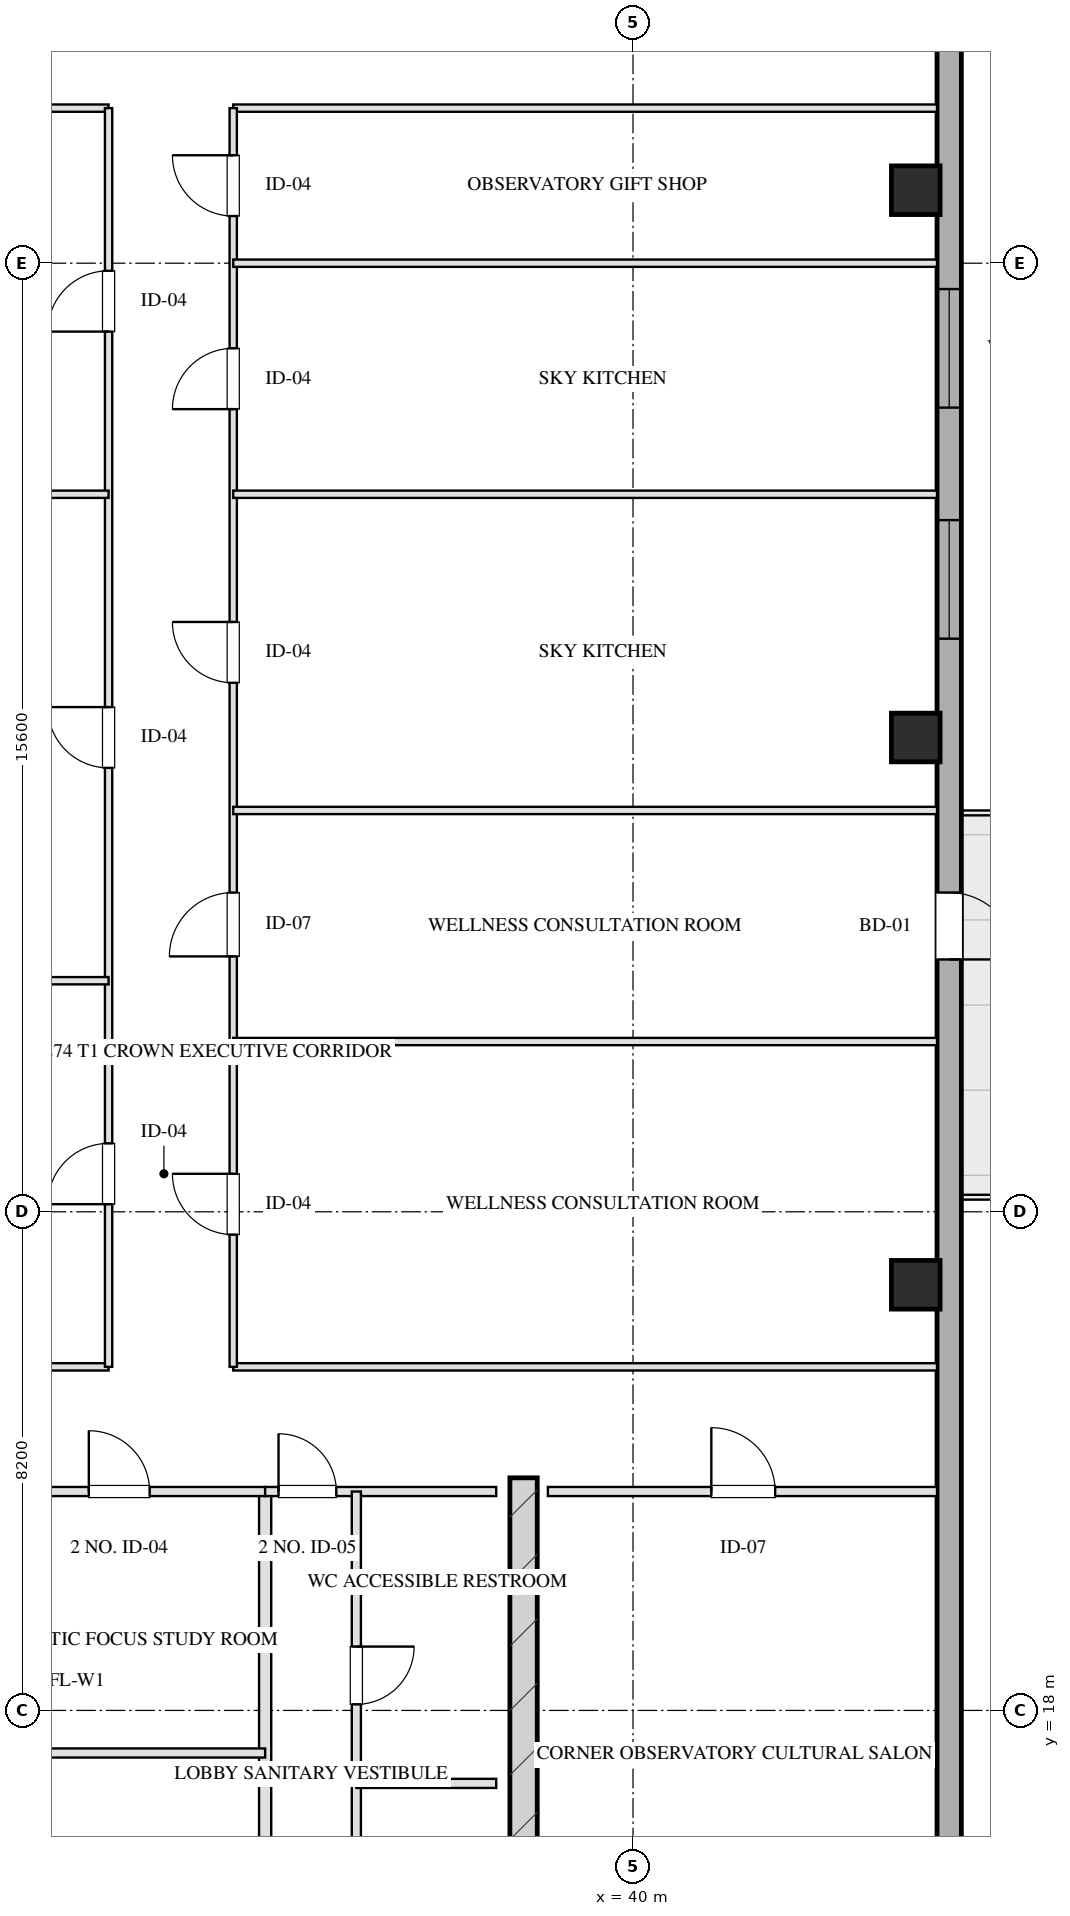
"""IFC4 building model, lengths in metres.
Left out: names, types, materials, properties, quantities, classifications, styles, units other than length and angle.
Written with IfcOpenShell. Run it as: python <this file> out.ifc"""

import sys

from ifc_helpers import new_model, si_unit, direction, frame, frame_2d, origin, origin_2d, place, context, subcontext, project, spatial, rectangle, hollow_rectangle, extrude, element, fill, save


model = new_model("IFC4")
c1 = context("Model", 3, precision=1e-05, world=origin(), true_north=direction((0.0, 1.0)))
c2 = subcontext(c1, "Body", "Model", "MODEL_VIEW")
j1 = project(units=[si_unit("LENGTHUNIT", "METRE"), si_unit("PLANEANGLEUNIT", "RADIAN")], contexts=[c1])
p1 = place(None, origin())
s1 = spatial("IfcSite", under=j1, at=p1, CompositionType="ELEMENT")
p2 = place(p1, origin())
s2 = spatial("IfcBuilding", under=s1, at=p2, CompositionType="ELEMENT")
p3 = place(p2, frame((0.0, 0.0, 269.6)))
s3 = spatial("IfcBuildingStorey", under=s2, at=p3, CompositionType="ELEMENT", Elevation=269.6)
p4 = place(p3, frame((38.2, 21.825, 0.0), z_axis=(0.0, 0.0, 1.0), x_axis=(0.0, -1.0, 0.0)))
e1 = element("IfcWall", 1, at=p4, inside=s3, PredefinedType="SHEAR", context=c2, shape_type="SweptSolid", body=[
    extrude(rectangle(XDim=9.33, YDim=0.45, at=frame_2d((4.665, 0.0))), origin(), (0.0, 0.0, 1.0), 3.2),
])
for number, where, z_axis, x_axis in (
    (2, (44.65, 25.0, 0.0), (0.0, 0.0, 1.0), (1.0, 0.0, 0.0)),
    (3, (44.65, 34.0, 0.0), (0.0, 0.0, 1.0), (1.0, 0.0, 0.0)),
    (4, (44.65, 43.0, 0.0), (0.0, 0.0, 1.0), (1.0, 0.0, 0.0)),
):
    element("IfcColumn", number, at=place(p3, frame(where, z_axis=z_axis, x_axis=x_axis)), inside=s3, PredefinedType="COLUMN", context=c2, shape_type="SweptSolid", body=[
        extrude(hollow_rectangle(XDim=0.8, YDim=0.8, WallThickness=0.028, at=origin_2d()), origin(), (0.0, 0.0, 1.0), 3.201),
    ])
p5 = place(p3, frame((45.2, 54.9, 0.0), z_axis=(0.0, 0.0, 1.0), x_axis=(0.0, -1.0, 0.0)))
e5 = element("IfcWall", 5, at=p5, inside=s3, PredefinedType="SOLIDWALL", context=c2, shape_type="SweptSolid", body=[
    extrude(rectangle(XDim=41.8, YDim=0.4, at=frame_2d((20.9, 0.0))), origin(), (0.0, 0.0, 1.0), 2.36),
])
p6 = place(p5, frame((17.325, 0.0, 0.75)))
e6 = element("IfcOpeningElement", 6, at=p6, cuts=e5, PredefinedType="OPENING", context=c2, shape_type="SweptSolid", body=[
    extrude(rectangle(XDim=1.95, YDim=1.21, at=frame_2d((0.975, 0.605))), frame((0.0, 0.21, 0.0), z_axis=(0.0, -1.0, 0.0), x_axis=(1.0, 0.0, 0.0)), (0.0, 0.0, 1.0), 0.42),
])
p7 = place(p5, frame((13.525, 0.0, 0.75)))
e7 = element("IfcOpeningElement", 7, at=p7, cuts=e5, PredefinedType="OPENING", context=c2, shape_type="SweptSolid", body=[
    extrude(rectangle(XDim=1.95, YDim=1.21, at=frame_2d((0.975, 0.605))), frame((0.0, 0.21, 0.0), z_axis=(0.0, -1.0, 0.0), x_axis=(1.0, 0.0, 0.0)), (0.0, 0.0, 1.0), 0.42),
])
p8 = place(p5, frame((23.45, 0.0, 0.0)))
e8 = element("IfcOpeningElement", 8, at=p8, cuts=e5, PredefinedType="OPENING", context=c2, shape_type="SweptSolid", body=[
    extrude(rectangle(XDim=1.1, YDim=2.15, at=frame_2d((0.55, 1.075))), frame((0.0, 0.21, 0.0), z_axis=(0.0, -1.0, 0.0), x_axis=(1.0, 0.0, 0.0)), (0.0, 0.0, 1.0), 0.42),
])
p9 = place(p3, frame((33.95, 21.6, 0.0), z_axis=(0.0, 0.0, 1.0), x_axis=(0.0, -1.0, 0.0)))
e9 = element("IfcWall", 9, at=p9, inside=s3, PredefinedType="PARTITIONING", context=c2, shape_type="SweptSolid", body=[
    extrude(rectangle(XDim=8.43, YDim=0.2, at=frame_2d((4.215, 0.0))), origin(), (0.0, 0.0, 1.0), 2.925),
])
p10 = place(p3, frame((29.55, 21.6, 0.0), z_axis=(0.0, 0.0, 1.0), x_axis=(1.0, 0.0, 0.0)))
e10 = element("IfcWall", 10, at=p10, inside=s3, PredefinedType="PARTITIONING", context=c2, shape_type="SweptSolid", body=[
    extrude(rectangle(XDim=4.4, YDim=0.15, at=frame_2d((2.2, 0.0))), origin(), (0.0, 0.0, 1.0), 2.925),
])
p11 = place(p10, frame((1.5, 0.0, 0.0)))
e11 = element("IfcOpeningElement", 11, at=p11, cuts=e10, PredefinedType="OPENING", context=c2, shape_type="SweptSolid", body=[
    extrude(rectangle(XDim=1.0, YDim=2.05, at=frame_2d((0.5, 1.025))), frame((0.0, 0.085, 0.0), z_axis=(0.0, -1.0, 0.0), x_axis=(1.0, 0.0, 0.0)), (0.0, 0.0, 1.0), 0.17),
])
p12 = place(p3, frame((29.55, 17.3, 0.0), z_axis=(0.0, 0.0, 1.0), x_axis=(1.0, 0.0, 0.0)))
e12 = element("IfcWall", 12, at=p12, inside=s3, PredefinedType="PARTITIONING", context=c2, shape_type="SweptSolid", body=[
    extrude(rectangle(XDim=4.4, YDim=0.15, at=frame_2d((2.2, 0.0))), origin(), (0.0, 0.0, 1.0), 2.925),
])
p13 = place(p3, frame((33.95, 21.6, 0.0), z_axis=(0.0, 0.0, 1.0), x_axis=(1.0, 0.0, 0.0)))
e13 = element("IfcWall", 13, at=p13, inside=s3, PredefinedType="PARTITIONING", context=c2, shape_type="SweptSolid", body=[
    extrude(rectangle(XDim=3.8, YDim=0.15, at=frame_2d((1.9, 0.0))), origin(), (0.0, 0.0, 1.0), 2.925),
])
p14 = place(p13, frame((0.22, 0.0, 0.0)))
e14 = element("IfcOpeningElement", 14, at=p14, cuts=e13, PredefinedType="OPENING", context=c2, shape_type="SweptSolid", body=[
    extrude(rectangle(XDim=0.95, YDim=2.05, at=frame_2d((0.475, 1.025))), frame((0.0, 0.085, 0.0), z_axis=(0.0, -1.0, 0.0), x_axis=(1.0, 0.0, 0.0)), (0.0, 0.0, 1.0), 0.17),
])
p15 = place(p3, frame((35.45, 21.6, 0.0), z_axis=(0.0, 0.0, 1.0), x_axis=(0.0, -1.0, 0.0)))
e15 = element("IfcWall", 15, at=p15, inside=s3, PredefinedType="PARTITIONING", context=c2, shape_type="SweptSolid", body=[
    extrude(rectangle(XDim=8.43, YDim=0.15, at=frame_2d((4.215, 0.0))), origin(), (0.0, 0.0, 1.0), 2.515),
])
p16 = place(p15, frame((2.55, 0.0, 0.0)))
e16 = element("IfcOpeningElement", 16, at=p16, cuts=e15, PredefinedType="OPENING", context=c2, shape_type="SweptSolid", body=[
    extrude(rectangle(XDim=0.95, YDim=2.05, at=frame_2d((0.475, 1.025))), frame((0.0, 0.085, 0.0), z_axis=(0.0, -1.0, 0.0), x_axis=(1.0, 0.0, 0.0)), (0.0, 0.0, 1.0), 0.17),
])
p17 = place(p15, frame((5.8, 0.0, 0.0)))
e17 = element("IfcOpeningElement", 17, at=p17, cuts=e15, PredefinedType="OPENING", context=c2, shape_type="SweptSolid", body=[
    extrude(rectangle(XDim=0.9, YDim=2.05, at=frame_2d((0.45, 1.025))), frame((0.0, 0.085, 0.0), z_axis=(0.0, -1.0, 0.0), x_axis=(1.0, 0.0, 0.0)), (0.0, 0.0, 1.0), 0.17),
])
p18 = place(p3, frame((35.45, 16.8, 0.0), z_axis=(0.0, 0.0, 1.0), x_axis=(1.0, 0.0, 0.0)))
e18 = element("IfcWall", 18, at=p18, inside=s3, PredefinedType="PARTITIONING", context=c2, shape_type="SweptSolid", body=[
    extrude(rectangle(XDim=2.3, YDim=0.15, at=frame_2d((1.15, 0.0))), origin(), (0.0, 0.0, 1.0), 2.925),
])
p19 = place(p3, frame((38.6, 21.6, 0.0), z_axis=(0.0, 0.0, 1.0), x_axis=(1.0, 0.0, 0.0)))
e19 = element("IfcWall", 19, at=p19, inside=s3, PredefinedType="PARTITIONING", context=c2, shape_type="SweptSolid", body=[
    extrude(rectangle(XDim=6.4, YDim=0.15, at=frame_2d((3.2, 0.0))), origin(), (0.0, 0.0, 1.0), 2.925),
])
p20 = place(p19, frame((2.688, 0.0, 0.0)))
e20 = element("IfcOpeningElement", 20, at=p20, cuts=e19, PredefinedType="OPENING", context=c2, shape_type="SweptSolid", body=[
    extrude(rectangle(XDim=1.05, YDim=2.05, at=frame_2d((0.525, 1.025))), frame((0.0, 0.085, 0.0), z_axis=(0.0, -1.0, 0.0), x_axis=(1.0, 0.0, 0.0)), (0.0, 0.0, 1.0), 0.17),
])
p21 = place(p3, frame((15.0, 23.65, 0.0), z_axis=(0.0, 0.0, 1.0), x_axis=(1.0, 0.0, 0.0)))
e21 = element("IfcWall", 21, at=p21, inside=s3, PredefinedType="PARTITIONING", context=c2, shape_type="SweptSolid", body=[
    extrude(rectangle(XDim=16.375, YDim=0.12, at=frame_2d((8.188, 0.0))), origin(), (0.0, 0.0, 1.0), 2.925),
])
p22 = place(p3, frame((33.425, 23.65, 0.0), z_axis=(0.0, 0.0, 1.0), x_axis=(1.0, 0.0, 0.0)))
e22 = element("IfcWall", 22, at=p22, inside=s3, PredefinedType="PARTITIONING", context=c2, shape_type="SweptSolid", body=[
    extrude(rectangle(XDim=11.575, YDim=0.12, at=frame_2d((5.788, 0.0))), origin(), (0.0, 0.0, 1.0), 2.925),
])
p23 = place(p3, frame((15.0, 44.35, 0.0), z_axis=(0.0, 0.0, 1.0), x_axis=(1.0, 0.0, 0.0)))
e23 = element("IfcWall", 23, at=p23, inside=s3, PredefinedType="PARTITIONING", context=c2, shape_type="SweptSolid", body=[
    extrude(rectangle(XDim=16.375, YDim=0.12, at=frame_2d((8.188, 0.0))), origin(), (0.0, 0.0, 1.0), 2.925),
])
p24 = place(p3, frame((33.425, 44.35, 0.0), z_axis=(0.0, 0.0, 1.0), x_axis=(1.0, 0.0, 0.0)))
e24 = element("IfcWall", 24, at=p24, inside=s3, PredefinedType="PARTITIONING", context=c2, shape_type="SweptSolid", body=[
    extrude(rectangle(XDim=11.575, YDim=0.12, at=frame_2d((5.788, 0.0))), origin(), (0.0, 0.0, 1.0), 2.925),
])
p25 = place(p3, frame((31.375, 23.65, 0.0), z_axis=(0.0, 0.0, 1.0), x_axis=(0.0, 1.0, 0.0)))
e25 = element("IfcWall", 25, at=p25, inside=s3, PredefinedType="PARTITIONING", context=c2, shape_type="SweptSolid", body=[
    extrude(rectangle(XDim=20.7, YDim=0.12, at=frame_2d((10.35, 0.0))), origin(), (0.0, 0.0, 1.0), 2.925),
])
p26 = place(p25, frame((2.675, 0.0, 0.0)))
e26 = element("IfcOpeningElement", 26, at=p26, cuts=e25, PredefinedType="OPENING", context=c2, shape_type="SweptSolid", body=[
    extrude(rectangle(XDim=1.0, YDim=2.05, at=frame_2d((0.5, 1.025))), frame((0.0, 0.07, 0.0), z_axis=(0.0, -1.0, 0.0), x_axis=(1.0, 0.0, 0.0)), (0.0, 0.0, 1.0), 0.14),
])
p27 = place(p25, frame((9.85, 0.0, 0.0)))
e27 = element("IfcOpeningElement", 27, at=p27, cuts=e25, PredefinedType="OPENING", context=c2, shape_type="SweptSolid", body=[
    extrude(rectangle(XDim=1.0, YDim=2.05, at=frame_2d((0.5, 1.025))), frame((0.0, 0.07, 0.0), z_axis=(0.0, -1.0, 0.0), x_axis=(1.0, 0.0, 0.0)), (0.0, 0.0, 1.0), 0.14),
])
p28 = place(p25, frame((17.025, 0.0, 0.0)))
e28 = element("IfcOpeningElement", 28, at=p28, cuts=e25, PredefinedType="OPENING", context=c2, shape_type="SweptSolid", body=[
    extrude(rectangle(XDim=1.0, YDim=2.05, at=frame_2d((0.5, 1.025))), frame((0.0, 0.07, 0.0), z_axis=(0.0, -1.0, 0.0), x_axis=(1.0, 0.0, 0.0)), (0.0, 0.0, 1.0), 0.14),
])
p29 = place(p3, frame((33.425, 23.65, 0.0), z_axis=(0.0, 0.0, 1.0), x_axis=(0.0, 1.0, 0.0)))
e29 = element("IfcWall", 29, at=p29, inside=s3, PredefinedType="PARTITIONING", context=c2, shape_type="SweptSolid", body=[
    extrude(rectangle(XDim=20.7, YDim=0.12, at=frame_2d((10.35, 0.0))), origin(), (0.0, 0.0, 1.0), 2.925),
])
p30 = place(p29, frame((2.175, 0.0, 0.0)))
e30 = element("IfcOpeningElement", 30, at=p30, cuts=e29, PredefinedType="OPENING", context=c2, shape_type="SweptSolid", body=[
    extrude(rectangle(XDim=1.0, YDim=2.05, at=frame_2d((0.5, 1.025))), frame((0.0, 0.07, 0.0), z_axis=(0.0, -1.0, 0.0), x_axis=(1.0, 0.0, 0.0)), (0.0, 0.0, 1.0), 0.14),
])
p31 = place(p29, frame((6.75, 0.0, 0.0)))
e31 = element("IfcOpeningElement", 31, at=p31, cuts=e29, PredefinedType="OPENING", context=c2, shape_type="SweptSolid", body=[
    extrude(rectangle(XDim=1.05, YDim=2.05, at=frame_2d((0.525, 1.025))), frame((0.0, 0.07, 0.0), z_axis=(0.0, -1.0, 0.0), x_axis=(1.0, 0.0, 0.0)), (0.0, 0.0, 1.0), 0.14),
])
p32 = place(p29, frame((11.25, 0.0, 0.0)))
e32 = element("IfcOpeningElement", 32, at=p32, cuts=e29, PredefinedType="OPENING", context=c2, shape_type="SweptSolid", body=[
    extrude(rectangle(XDim=1.0, YDim=2.05, at=frame_2d((0.5, 1.025))), frame((0.0, 0.07, 0.0), z_axis=(0.0, -1.0, 0.0), x_axis=(1.0, 0.0, 0.0)), (0.0, 0.0, 1.0), 0.14),
])
p33 = place(p29, frame((15.75, 0.0, 0.0)))
e33 = element("IfcOpeningElement", 33, at=p33, cuts=e29, PredefinedType="OPENING", context=c2, shape_type="SweptSolid", body=[
    extrude(rectangle(XDim=1.0, YDim=2.05, at=frame_2d((0.5, 1.025))), frame((0.0, 0.07, 0.0), z_axis=(0.0, -1.0, 0.0), x_axis=(1.0, 0.0, 0.0)), (0.0, 0.0, 1.0), 0.14),
])
p34 = place(p29, frame((18.925, 0.0, 0.0)))
e34 = element("IfcOpeningElement", 34, at=p34, cuts=e29, PredefinedType="OPENING", context=c2, shape_type="SweptSolid", body=[
    extrude(rectangle(XDim=1.0, YDim=2.05, at=frame_2d((0.5, 1.025))), frame((0.0, 0.07, 0.0), z_axis=(0.0, -1.0, 0.0), x_axis=(1.0, 0.0, 0.0)), (0.0, 0.0, 1.0), 0.14),
])
for number, where, z_axis, x_axis in (
    (35, (15.0, 30.0, 0.0), (0.0, 0.0, 1.0), (1.0, 0.0, 0.0)),
    (36, (15.0, 38.0, 0.0), (0.0, 0.0, 1.0), (1.0, 0.0, 0.0)),
):
    element("IfcWall", number, at=place(p3, frame(where, z_axis=z_axis, x_axis=x_axis)), inside=s3, PredefinedType="PARTITIONING", context=c2, shape_type="SweptSolid", body=[
        extrude(rectangle(XDim=16.375, YDim=0.12, at=frame_2d((8.188, 0.0))), origin(), (0.0, 0.0, 1.0), 2.925),
    ])
for number, where, z_axis, x_axis in (
    (37, (33.425, 29.0, 0.0), (0.0, 0.0, 1.0), (1.0, 0.0, 0.0)),
    (38, (33.425, 32.8, 0.0), (0.0, 0.0, 1.0), (1.0, 0.0, 0.0)),
    (39, (33.425, 38.0, 0.0), (0.0, 0.0, 1.0), (1.0, 0.0, 0.0)),
    (40, (33.425, 41.8, 0.0), (0.0, 0.0, 1.0), (1.0, 0.0, 0.0)),
):
    element("IfcWall", number, at=place(p3, frame(where, z_axis=z_axis, x_axis=x_axis)), inside=s3, PredefinedType="PARTITIONING", context=c2, shape_type="SweptSolid", body=[
        extrude(rectangle(XDim=11.575, YDim=0.12, at=frame_2d((5.788, 0.0))), origin(), (0.0, 0.0, 1.0), 2.925),
    ])
p35 = place(p6, origin())
e41 = element("IfcWindow", 41, at=p35, inside=s3, PartitioningType="TRIPLE_PANEL_VERTICAL", PredefinedType="WINDOW", context=c2, shape_type="SweptSolid", body=[
    extrude(rectangle(XDim=1.95, YDim=1.21, at=frame_2d((0.975, 0.605))), frame((0.0, 0.03, 0.0), z_axis=(0.0, -1.0, 0.0), x_axis=(1.0, 0.0, 0.0)), (0.0, 0.0, 1.0), 0.06),
])
fill(e6, e41)
p36 = place(p7, origin())
e42 = element("IfcWindow", 42, at=p36, inside=s3, PartitioningType="TRIPLE_PANEL_VERTICAL", PredefinedType="WINDOW", context=c2, shape_type="SweptSolid", body=[
    extrude(rectangle(XDim=1.95, YDim=1.21, at=frame_2d((0.975, 0.605))), frame((0.0, 0.03, 0.0), z_axis=(0.0, -1.0, 0.0), x_axis=(1.0, 0.0, 0.0)), (0.0, 0.0, 1.0), 0.06),
])
fill(e7, e42)
p37 = place(p8, origin())
e43 = element("IfcDoor", 43, at=p37, inside=s3, OperationType="SINGLE_SWING_RIGHT", PredefinedType="DOOR", context=c2, shape_type="SweptSolid", body=[
    extrude(rectangle(XDim=1.1, YDim=2.15, at=frame_2d((0.55, 1.075))), frame((0.0, 0.025, 0.0), z_axis=(0.0, -1.0, 0.0), x_axis=(1.0, 0.0, 0.0)), (0.0, 0.0, 1.0), 0.05),
])
fill(e8, e43)
p38 = place(p11, origin())
e44 = element("IfcDoor", 44, at=p38, inside=s3, OperationType="SINGLE_SWING_LEFT", PredefinedType="DOOR", context=c2, shape_type="SweptSolid", body=[
    extrude(rectangle(XDim=1.0, YDim=2.05, at=frame_2d((0.5, 1.025))), frame((0.0, 0.025, 0.0), z_axis=(0.0, -1.0, 0.0), x_axis=(1.0, 0.0, 0.0)), (0.0, 0.0, 1.0), 0.05),
])
fill(e11, e44)
p39 = place(p14, origin())
e45 = element("IfcDoor", 45, at=p39, inside=s3, OperationType="SINGLE_SWING_LEFT", PredefinedType="DOOR", context=c2, shape_type="SweptSolid", body=[
    extrude(rectangle(XDim=0.95, YDim=2.05, at=frame_2d((0.475, 1.025))), frame((0.0, 0.025, 0.0), z_axis=(0.0, -1.0, 0.0), x_axis=(1.0, 0.0, 0.0)), (0.0, 0.0, 1.0), 0.05),
])
fill(e14, e45)
p40 = place(p16, origin())
e46 = element("IfcDoor", 46, at=p40, inside=s3, OperationType="SINGLE_SWING_LEFT", PredefinedType="DOOR", context=c2, shape_type="SweptSolid", body=[
    extrude(rectangle(XDim=0.95, YDim=2.05, at=frame_2d((0.475, 1.025))), frame((0.0, 0.025, 0.0), z_axis=(0.0, -1.0, 0.0), x_axis=(1.0, 0.0, 0.0)), (0.0, 0.0, 1.0), 0.05),
])
fill(e16, e46)
p41 = place(p20, origin())
e47 = element("IfcDoor", 47, at=p41, inside=s3, OperationType="SINGLE_SWING_LEFT", PredefinedType="DOOR", context=c2, shape_type="SweptSolid", body=[
    extrude(rectangle(XDim=1.05, YDim=2.05, at=frame_2d((0.525, 1.025))), frame((0.0, 0.025, 0.0), z_axis=(0.0, -1.0, 0.0), x_axis=(1.0, 0.0, 0.0)), (0.0, 0.0, 1.0), 0.05),
])
fill(e20, e47)
p42 = place(p26, origin())
e48 = element("IfcDoor", 48, at=p42, inside=s3, OperationType="SINGLE_SWING_LEFT", PredefinedType="DOOR", context=c2, shape_type="SweptSolid", body=[
    extrude(rectangle(XDim=1.0, YDim=2.05, at=frame_2d((0.5, 1.025))), frame((0.0, 0.025, 0.0), z_axis=(0.0, -1.0, 0.0), x_axis=(1.0, 0.0, 0.0)), (0.0, 0.0, 1.0), 0.05),
])
fill(e26, e48)
p43 = place(p27, origin())
e49 = element("IfcDoor", 49, at=p43, inside=s3, OperationType="SINGLE_SWING_RIGHT", PredefinedType="DOOR", context=c2, shape_type="SweptSolid", body=[
    extrude(rectangle(XDim=1.0, YDim=2.05, at=frame_2d((0.5, 1.025))), frame((0.0, 0.025, 0.0), z_axis=(0.0, -1.0, 0.0), x_axis=(1.0, 0.0, 0.0)), (0.0, 0.0, 1.0), 0.05),
])
fill(e27, e49)
p44 = place(p28, origin())
e50 = element("IfcDoor", 50, at=p44, inside=s3, OperationType="SINGLE_SWING_LEFT", PredefinedType="DOOR", context=c2, shape_type="SweptSolid", body=[
    extrude(rectangle(XDim=1.0, YDim=2.05, at=frame_2d((0.5, 1.025))), frame((0.0, 0.025, 0.0), z_axis=(0.0, -1.0, 0.0), x_axis=(1.0, 0.0, 0.0)), (0.0, 0.0, 1.0), 0.05),
])
fill(e28, e50)
p45 = place(p30, origin())
e51 = element("IfcDoor", 51, at=p45, inside=s3, OperationType="SINGLE_SWING_RIGHT", PredefinedType="DOOR", context=c2, shape_type="SweptSolid", body=[
    extrude(rectangle(XDim=1.0, YDim=2.05, at=frame_2d((0.5, 1.025))), frame((0.0, 0.025, 0.0), z_axis=(0.0, -1.0, 0.0), x_axis=(1.0, 0.0, 0.0)), (0.0, 0.0, 1.0), 0.05),
])
fill(e30, e51)
p46 = place(p31, origin())
e52 = element("IfcDoor", 52, at=p46, inside=s3, OperationType="SINGLE_SWING_LEFT", PredefinedType="DOOR", context=c2, shape_type="SweptSolid", body=[
    extrude(rectangle(XDim=1.05, YDim=2.05, at=frame_2d((0.525, 1.025))), frame((0.0, 0.025, 0.0), z_axis=(0.0, -1.0, 0.0), x_axis=(1.0, 0.0, 0.0)), (0.0, 0.0, 1.0), 0.05),
])
fill(e31, e52)
p47 = place(p32, origin())
e53 = element("IfcDoor", 53, at=p47, inside=s3, OperationType="SINGLE_SWING_RIGHT", PredefinedType="DOOR", context=c2, shape_type="SweptSolid", body=[
    extrude(rectangle(XDim=1.0, YDim=2.05, at=frame_2d((0.5, 1.025))), frame((0.0, 0.025, 0.0), z_axis=(0.0, -1.0, 0.0), x_axis=(1.0, 0.0, 0.0)), (0.0, 0.0, 1.0), 0.05),
])
fill(e32, e53)
p48 = place(p33, origin())
e54 = element("IfcDoor", 54, at=p48, inside=s3, OperationType="SINGLE_SWING_LEFT", PredefinedType="DOOR", context=c2, shape_type="SweptSolid", body=[
    extrude(rectangle(XDim=1.0, YDim=2.05, at=frame_2d((0.5, 1.025))), frame((0.0, 0.025, 0.0), z_axis=(0.0, -1.0, 0.0), x_axis=(1.0, 0.0, 0.0)), (0.0, 0.0, 1.0), 0.05),
])
fill(e33, e54)
p49 = place(p34, origin())
e55 = element("IfcDoor", 55, at=p49, inside=s3, OperationType="SINGLE_SWING_RIGHT", PredefinedType="DOOR", context=c2, shape_type="SweptSolid", body=[
    extrude(rectangle(XDim=1.0, YDim=2.05, at=frame_2d((0.5, 1.025))), frame((0.0, 0.025, 0.0), z_axis=(0.0, -1.0, 0.0), x_axis=(1.0, 0.0, 0.0)), (0.0, 0.0, 1.0), 0.05),
])
fill(e34, e55)
save(model, sys.argv[1])
